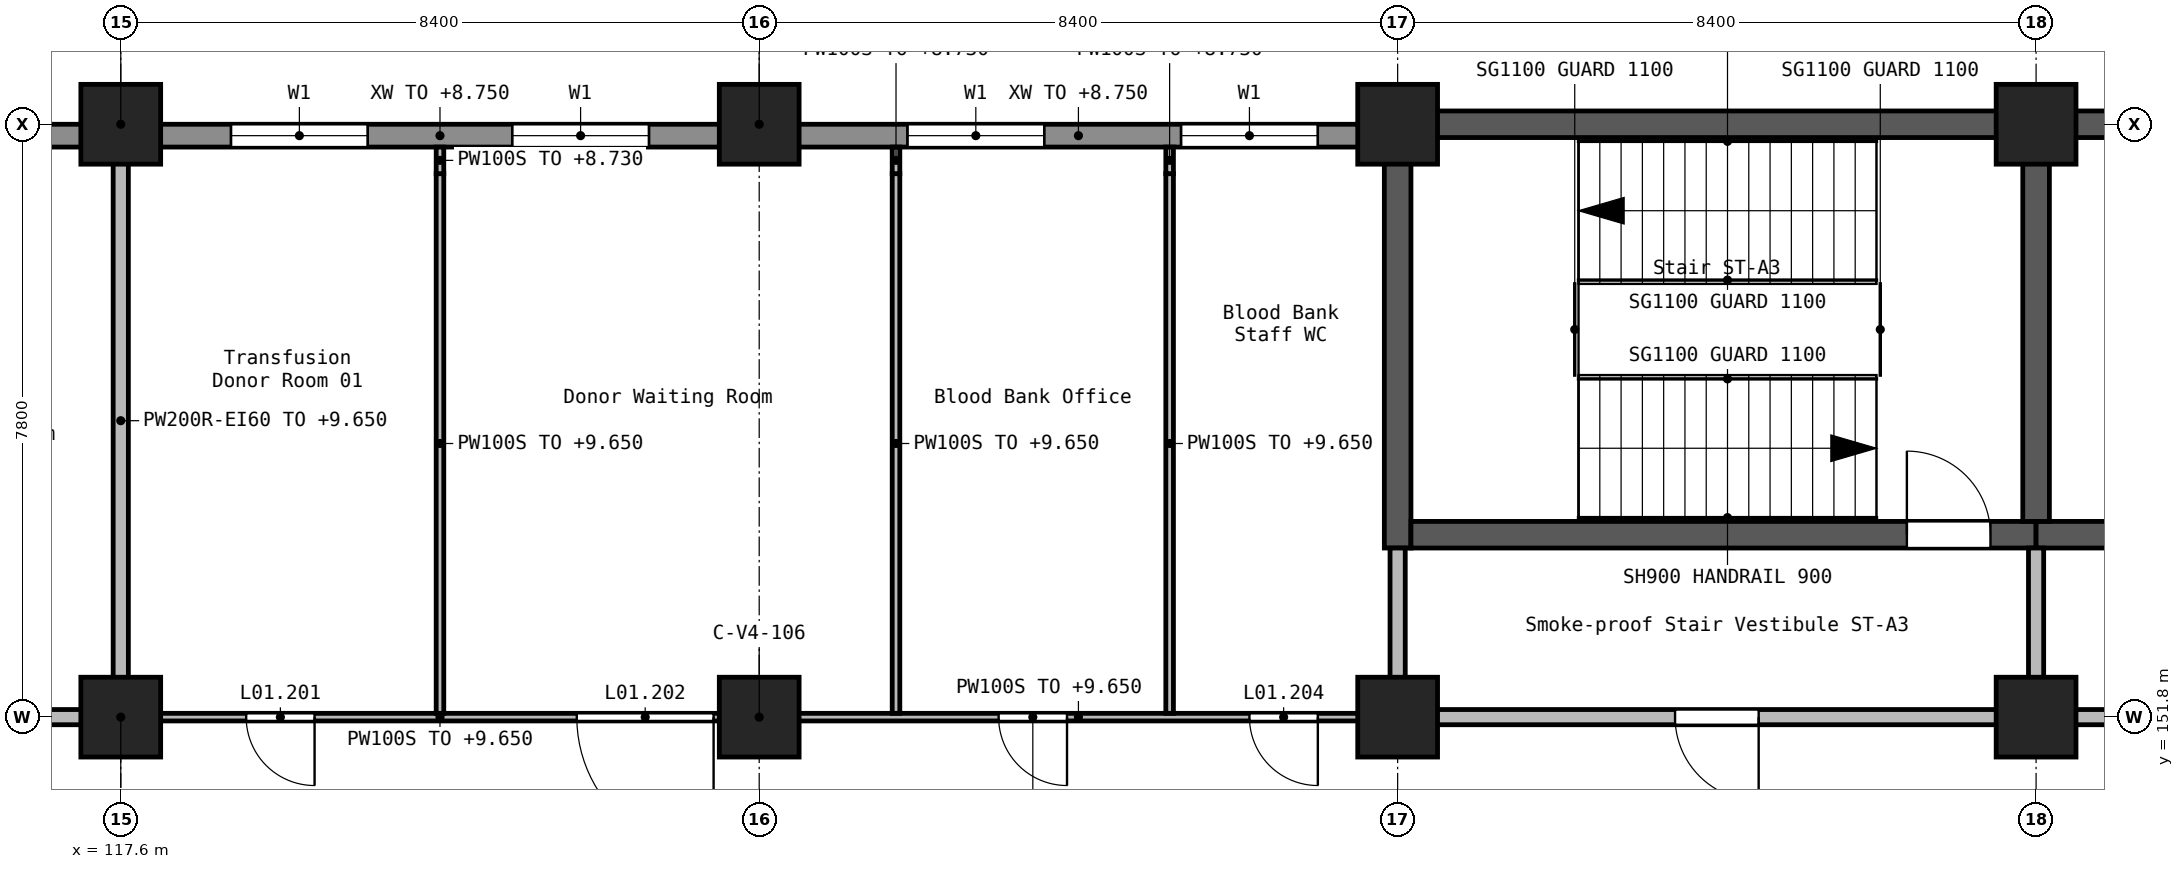
"""IFC4 building model, lengths in metres.
Left out: names, types, materials, properties, quantities, classifications, styles, units other than length and angle.
Written with IfcOpenShell. Run it as: python <this file> out.ifc"""

import sys

from ifc_helpers import new_model, si_unit, direction, frame, frame_2d, origin, origin_2d, place, context, subcontext, project, spatial, rectangle, extrude, element, fill, save


model = new_model("IFC4")
c1 = context("Model", 3, precision=1e-05, world=origin(), true_north=direction((0.0, 1.0)))
c2 = subcontext(c1, "Body", "Model", "MODEL_VIEW")
j1 = project(units=[si_unit("LENGTHUNIT", "METRE"), si_unit("PLANEANGLEUNIT", "RADIAN")], contexts=[c1])
p1 = place(None, origin())
s1 = spatial("IfcSite", under=j1, at=p1, CompositionType="ELEMENT")
p2 = place(p1, origin())
s2 = spatial("IfcBuilding", under=s1, at=p2, CompositionType="ELEMENT")
p3 = place(p2, frame((0.0, 0.0, 5.4)))
s3 = spatial("IfcBuildingStorey", under=s2, at=p3, CompositionType="ELEMENT", Elevation=5.4)
for number, where, z_axis, x_axis in (
    (1, (117.6, 151.8, 0.0), (0.0, 0.0, 1.0), (1.0, 0.0, 0.0)),
    (2, (117.6, 159.6, 0.0), (0.0, 0.0, 1.0), (1.0, 0.0, 0.0)),
    (3, (126.0, 151.8, 0.0), (0.0, 0.0, 1.0), (1.0, 0.0, 0.0)),
    (4, (126.0, 159.6, 0.0), (0.0, 0.0, 1.0), (1.0, 0.0, 0.0)),
    (5, (134.4, 151.8, 0.0), (0.0, 0.0, 1.0), (1.0, 0.0, 0.0)),
    (6, (134.4, 159.6, 0.0), (0.0, 0.0, 1.0), (1.0, 0.0, 0.0)),
    (7, (142.8, 151.8, 0.0), (0.0, 0.0, 1.0), (1.0, 0.0, 0.0)),
    (8, (142.8, 159.6, 0.0), (0.0, 0.0, 1.0), (1.0, 0.0, 0.0)),
):
    element("IfcColumn", number, at=place(p3, frame(where, z_axis=z_axis, x_axis=x_axis)), inside=s3, PredefinedType="COLUMN", context=c2, shape_type="SweptSolid", body=[
        extrude(rectangle(XDim=1.05, YDim=1.05, at=origin_2d()), origin(), (0.0, 0.0, 1.0), 4.5),
    ])
p4 = place(p3, frame((134.225, 159.6, 0.0), z_axis=(0.0, 0.0, 1.0), x_axis=(1.0, 0.0, 0.0)))
e9 = element("IfcWall", 9, at=p4, inside=s3, PredefinedType="SHEAR", context=c2, shape_type="SweptSolid", body=[
    extrude(rectangle(XDim=8.575, YDim=0.35, at=frame_2d((4.288, 0.0))), origin(), (0.0, 0.0, 1.0), 4.5),
])
p5 = place(p3, frame((134.4, 154.025, 0.0), z_axis=(0.0, 0.0, 1.0), x_axis=(0.0, 1.0, 0.0)))
e10 = element("IfcWall", 10, at=p5, inside=s3, PredefinedType="SHEAR", context=c2, shape_type="SweptSolid", body=[
    extrude(rectangle(XDim=5.4, YDim=0.35, at=frame_2d((2.7, 0.0))), origin(), (0.0, 0.0, 1.0), 4.5),
])
p6 = place(p3, frame((134.575, 154.2, 0.0), z_axis=(0.0, 0.0, 1.0), x_axis=(1.0, 0.0, 0.0)))
e11 = element("IfcWall", 11, at=p6, inside=s3, PredefinedType="SHEAR", context=c2, shape_type="SweptSolid", body=[
    extrude(rectangle(XDim=8.225, YDim=0.35, at=frame_2d((4.113, 0.0))), origin(), (0.0, 0.0, 1.0), 4.5),
])
p7 = place(p6, frame((6.525, 0.0, 0.0)))
e12 = element("IfcOpeningElement", 12, at=p7, cuts=e11, PredefinedType="OPENING", context=c2, shape_type="SweptSolid", body=[
    extrude(rectangle(XDim=1.1, YDim=2.1, at=frame_2d((0.55, 1.05))), frame((0.0, 0.185, 0.0), z_axis=(0.0, -1.0, 0.0), x_axis=(1.0, 0.0, 0.0)), (0.0, 0.0, 1.0), 0.37),
])
p8 = place(p3, frame((142.8, 154.2, 0.0), z_axis=(0.0, 0.0, 1.0), x_axis=(1.0, 0.0, 0.0)))
e13 = element("IfcWall", 13, at=p8, inside=s3, PredefinedType="SHEAR", context=c2, shape_type="SweptSolid", body=[
    extrude(rectangle(XDim=8.4, YDim=0.35, at=frame_2d((4.2, 0.0))), origin(), (0.0, 0.0, 1.0), 4.5),
])
p9 = place(p8, frame((6.7, 0.0, 0.0)))
e14 = element("IfcOpeningElement", 14, at=p9, cuts=e13, PredefinedType="OPENING", context=c2, shape_type="SweptSolid", body=[
    extrude(rectangle(XDim=1.1, YDim=2.1, at=frame_2d((0.55, 1.05))), frame((0.0, 0.185, 0.0), z_axis=(0.0, -1.0, 0.0), x_axis=(1.0, 0.0, 0.0)), (0.0, 0.0, 1.0), 0.37),
])
p10 = place(p3, frame((142.8, 154.375, 0.0), z_axis=(0.0, 0.0, 1.0), x_axis=(0.0, 1.0, 0.0)))
e15 = element("IfcWall", 15, at=p10, inside=s3, PredefinedType="SHEAR", context=c2, shape_type="SweptSolid", body=[
    extrude(rectangle(XDim=5.05, YDim=0.35, at=frame_2d((2.525, 0.0))), origin(), (0.0, 0.0, 1.0), 4.5),
])
p11 = place(p3, frame((142.8, 159.6, 0.0), z_axis=(0.0, 0.0, 1.0), x_axis=(1.0, 0.0, 0.0)))
e16 = element("IfcWall", 16, at=p11, inside=s3, PredefinedType="SHEAR", context=c2, shape_type="SweptSolid", body=[
    extrude(rectangle(XDim=8.4, YDim=0.35, at=frame_2d((4.2, 0.0))), origin(), (0.0, 0.0, 1.0), 4.5),
])
p12 = place(p3, frame((133.9, 159.45, 0.0), z_axis=(0.0, 0.0, 1.0), x_axis=(-1.0, 0.0, 0.0)))
e17 = element("IfcWall", 17, at=p12, inside=s3, PredefinedType="STANDARD", context=c2, shape_type="SweptSolid", body=[
    extrude(rectangle(XDim=7.4, YDim=0.3, at=frame_2d((3.7, 0.0))), origin(), (0.0, 0.0, 1.0), 3.35),
])
p13 = place(p12, frame((0.55, 0.0, 0.9)))
e18 = element("IfcOpeningElement", 18, at=p13, cuts=e17, PredefinedType="OPENING", context=c2, shape_type="SweptSolid", body=[
    extrude(rectangle(XDim=1.8, YDim=1.5, at=frame_2d((0.9, 0.75))), frame((0.0, 0.16, 0.0), z_axis=(0.0, -1.0, 0.0), x_axis=(1.0, 0.0, 0.0)), (0.0, 0.0, 1.0), 0.32),
])
p14 = place(p12, frame((4.15, 0.0, 0.9)))
e19 = element("IfcOpeningElement", 19, at=p14, cuts=e17, PredefinedType="OPENING", context=c2, shape_type="SweptSolid", body=[
    extrude(rectangle(XDim=1.8, YDim=1.5, at=frame_2d((0.9, 0.75))), frame((0.0, 0.16, 0.0), z_axis=(0.0, -1.0, 0.0), x_axis=(1.0, 0.0, 0.0)), (0.0, 0.0, 1.0), 0.32),
])
p15 = place(p3, frame((125.5, 159.45, 0.0), z_axis=(0.0, 0.0, 1.0), x_axis=(-1.0, 0.0, 0.0)))
e20 = element("IfcWall", 20, at=p15, inside=s3, PredefinedType="STANDARD", context=c2, shape_type="SweptSolid", body=[
    extrude(rectangle(XDim=7.4, YDim=0.3, at=frame_2d((3.7, 0.0))), origin(), (0.0, 0.0, 1.0), 3.35),
])
p16 = place(p15, frame((0.95, 0.0, 0.9)))
e21 = element("IfcOpeningElement", 21, at=p16, cuts=e20, PredefinedType="OPENING", context=c2, shape_type="SweptSolid", body=[
    extrude(rectangle(XDim=1.8, YDim=1.5, at=frame_2d((0.9, 0.75))), frame((0.0, 0.16, 0.0), z_axis=(0.0, -1.0, 0.0), x_axis=(1.0, 0.0, 0.0)), (0.0, 0.0, 1.0), 0.32),
])
p17 = place(p15, frame((4.65, 0.0, 0.9)))
e22 = element("IfcOpeningElement", 22, at=p17, cuts=e20, PredefinedType="OPENING", context=c2, shape_type="SweptSolid", body=[
    extrude(rectangle(XDim=1.8, YDim=1.5, at=frame_2d((0.9, 0.75))), frame((0.0, 0.16, 0.0), z_axis=(0.0, -1.0, 0.0), x_axis=(1.0, 0.0, 0.0)), (0.0, 0.0, 1.0), 0.32),
])
p18 = place(p3, frame((117.1, 159.45, 0.0), z_axis=(0.0, 0.0, 1.0), x_axis=(-1.0, 0.0, 0.0)))
e23 = element("IfcWall", 23, at=p18, inside=s3, PredefinedType="STANDARD", context=c2, shape_type="SweptSolid", body=[
    extrude(rectangle(XDim=7.4, YDim=0.3, at=frame_2d((3.7, 0.0))), origin(), (0.0, 0.0, 1.0), 3.35),
])
p19 = place(p18, frame((0.95, 0.0, 0.9)))
e24 = element("IfcOpeningElement", 24, at=p19, cuts=e23, PredefinedType="OPENING", context=c2, shape_type="SweptSolid", body=[
    extrude(rectangle(XDim=1.8, YDim=1.5, at=frame_2d((0.9, 0.75))), frame((0.0, 0.16, 0.0), z_axis=(0.0, -1.0, 0.0), x_axis=(1.0, 0.0, 0.0)), (0.0, 0.0, 1.0), 0.32),
])
p20 = place(p18, frame((4.65, 0.0, 0.9)))
e25 = element("IfcOpeningElement", 25, at=p20, cuts=e23, PredefinedType="OPENING", context=c2, shape_type="SweptSolid", body=[
    extrude(rectangle(XDim=1.8, YDim=1.5, at=frame_2d((0.9, 0.75))), frame((0.0, 0.16, 0.0), z_axis=(0.0, -1.0, 0.0), x_axis=(1.0, 0.0, 0.0)), (0.0, 0.0, 1.0), 0.32),
])
p21 = place(p3, frame((150.7, 151.8, 0.0), z_axis=(0.0, 0.0, 1.0), x_axis=(-1.0, 0.0, 0.0)))
e26 = element("IfcWall", 26, at=p21, inside=s3, PredefinedType="SOLIDWALL", context=c2, shape_type="SweptSolid", body=[
    extrude(rectangle(XDim=7.4, YDim=0.2, at=frame_2d((3.7, 0.0))), origin(), (0.0, 0.0, 1.0), 4.25),
])
p22 = place(p21, frame((3.15, 0.0, 0.0)))
e27 = element("IfcOpeningElement", 27, at=p22, cuts=e26, PredefinedType="OPENING", context=c2, shape_type="SweptSolid", body=[
    extrude(rectangle(XDim=1.1, YDim=2.1, at=frame_2d((0.55, 1.05))), frame((0.0, 0.11, 0.0), z_axis=(0.0, -1.0, 0.0), x_axis=(1.0, 0.0, 0.0)), (0.0, 0.0, 1.0), 0.22),
])
p23 = place(p3, frame((142.3, 151.8, 0.0), z_axis=(0.0, 0.0, 1.0), x_axis=(-1.0, 0.0, 0.0)))
e28 = element("IfcWall", 28, at=p23, inside=s3, PredefinedType="SOLIDWALL", context=c2, shape_type="SweptSolid", body=[
    extrude(rectangle(XDim=7.4, YDim=0.2, at=frame_2d((3.7, 0.0))), origin(), (0.0, 0.0, 1.0), 4.25),
])
p24 = place(p23, frame((3.15, 0.0, 0.0)))
e29 = element("IfcOpeningElement", 29, at=p24, cuts=e28, PredefinedType="OPENING", context=c2, shape_type="SweptSolid", body=[
    extrude(rectangle(XDim=1.1, YDim=2.1, at=frame_2d((0.55, 1.05))), frame((0.0, 0.11, 0.0), z_axis=(0.0, -1.0, 0.0), x_axis=(1.0, 0.0, 0.0)), (0.0, 0.0, 1.0), 0.22),
])
p25 = place(p3, frame((109.7, 151.8, 0.0), z_axis=(0.0, 0.0, 1.0), x_axis=(1.0, 0.0, 0.0)))
e30 = element("IfcWall", 30, at=p25, inside=s3, PredefinedType="SOLIDWALL", context=c2, shape_type="SweptSolid", body=[
    extrude(rectangle(XDim=7.4, YDim=0.2, at=frame_2d((3.7, 0.0))), origin(), (0.0, 0.0, 1.0), 4.25),
])
p26 = place(p25, frame((1.4, 0.0, 0.0)))
e31 = element("IfcOpeningElement", 31, at=p26, cuts=e30, PredefinedType="OPENING", context=c2, shape_type="SweptSolid", body=[
    extrude(rectangle(XDim=1.0, YDim=2.1, at=frame_2d((0.5, 1.05))), frame((0.0, 0.11, 0.0), z_axis=(0.0, -1.0, 0.0), x_axis=(1.0, 0.0, 0.0)), (0.0, 0.0, 1.0), 0.22),
])
p27 = place(p25, frame((5.6, 0.0, 0.0)))
e32 = element("IfcOpeningElement", 32, at=p27, cuts=e30, PredefinedType="OPENING", context=c2, shape_type="SweptSolid", body=[
    extrude(rectangle(XDim=1.0, YDim=2.1, at=frame_2d((0.5, 1.05))), frame((0.0, 0.11, 0.0), z_axis=(0.0, -1.0, 0.0), x_axis=(1.0, 0.0, 0.0)), (0.0, 0.0, 1.0), 0.22),
])
p28 = place(p3, frame((117.6, 152.3, 0.0), z_axis=(0.0, 0.0, 1.0), x_axis=(0.0, 1.0, 0.0)))
e33 = element("IfcWall", 33, at=p28, inside=s3, PredefinedType="SOLIDWALL", context=c2, shape_type="SweptSolid", body=[
    extrude(rectangle(XDim=6.8, YDim=0.2, at=frame_2d((3.4, 0.0))), origin(), (0.0, 0.0, 1.0), 4.25),
])
for number, where, z_axis, x_axis in (
    (34, (134.4, 152.3, 0.0), (0.0, 0.0, 1.0), (0.0, 1.0, 0.0)),
    (35, (142.8, 152.3, 0.0), (0.0, 0.0, 1.0), (0.0, 1.0, 0.0)),
):
    element("IfcWall", number, at=place(p3, frame(where, z_axis=z_axis, x_axis=x_axis)), inside=s3, PredefinedType="SOLIDWALL", context=c2, shape_type="SweptSolid", body=[
        extrude(rectangle(XDim=1.725, YDim=0.2, at=frame_2d((0.862, 0.0))), origin(), (0.0, 0.0, 1.0), 4.25),
    ])
p29 = place(p3, frame((133.9, 151.8, 0.0), z_axis=(0.0, 0.0, 1.0), x_axis=(-1.0, 0.0, 0.0)))
e36 = element("IfcWall", 36, at=p29, inside=s3, PredefinedType="PARTITIONING", context=c2, shape_type="SweptSolid", body=[
    extrude(rectangle(XDim=7.4, YDim=0.1, at=frame_2d((3.7, 0.0))), origin(), (0.0, 0.0, 1.0), 4.25),
])
p30 = place(p29, frame((3.85, 0.0, 0.0)))
e37 = element("IfcOpeningElement", 37, at=p30, cuts=e36, PredefinedType="OPENING", context=c2, shape_type="SweptSolid", body=[
    extrude(rectangle(XDim=0.9, YDim=2.1, at=frame_2d((0.45, 1.05))), frame((0.0, 0.06, 0.0), z_axis=(0.0, -1.0, 0.0), x_axis=(1.0, 0.0, 0.0)), (0.0, 0.0, 1.0), 0.12),
])
p31 = place(p29, frame((0.55, 0.0, 0.0)))
e38 = element("IfcOpeningElement", 38, at=p31, cuts=e36, PredefinedType="OPENING", context=c2, shape_type="SweptSolid", body=[
    extrude(rectangle(XDim=0.9, YDim=2.1, at=frame_2d((0.45, 1.05))), frame((0.0, 0.06, 0.0), z_axis=(0.0, -1.0, 0.0), x_axis=(1.0, 0.0, 0.0)), (0.0, 0.0, 1.0), 0.12),
])
p32 = place(p3, frame((125.5, 151.8, 0.0), z_axis=(0.0, 0.0, 1.0), x_axis=(-1.0, 0.0, 0.0)))
e39 = element("IfcWall", 39, at=p32, inside=s3, PredefinedType="PARTITIONING", context=c2, shape_type="SweptSolid", body=[
    extrude(rectangle(XDim=7.4, YDim=0.1, at=frame_2d((3.7, 0.0))), origin(), (0.0, 0.0, 1.0), 4.25),
])
p33 = place(p32, frame((5.35, 0.0, 0.0)))
e40 = element("IfcOpeningElement", 40, at=p33, cuts=e39, PredefinedType="OPENING", context=c2, shape_type="SweptSolid", body=[
    extrude(rectangle(XDim=0.9, YDim=2.1, at=frame_2d((0.45, 1.05))), frame((0.0, 0.06, 0.0), z_axis=(0.0, -1.0, 0.0), x_axis=(1.0, 0.0, 0.0)), (0.0, 0.0, 1.0), 0.12),
])
p34 = place(p32, frame((0.1, 0.0, 0.0)))
e41 = element("IfcOpeningElement", 41, at=p34, cuts=e39, PredefinedType="OPENING", context=c2, shape_type="SweptSolid", body=[
    extrude(rectangle(XDim=1.8, YDim=2.1, at=frame_2d((0.9, 1.05))), frame((0.0, 0.06, 0.0), z_axis=(0.0, -1.0, 0.0), x_axis=(1.0, 0.0, 0.0)), (0.0, 0.0, 1.0), 0.12),
])
p35 = place(p3, frame((121.8, 151.85, 0.0), z_axis=(0.0, 0.0, 1.0), x_axis=(0.0, 1.0, 0.0)))
e42 = element("IfcWall", 42, at=p35, inside=s3, PredefinedType="PARTITIONING", context=c2, shape_type="SweptSolid", body=[
    extrude(rectangle(XDim=7.1, YDim=0.1, at=frame_2d((3.55, 0.0))), origin(), (0.0, 0.0, 1.0), 4.25),
])
p36 = place(p3, frame((121.8, 158.95, 0.0), z_axis=(0.0, 0.0, 1.0), x_axis=(0.0, 1.0, 0.0)))
e43 = element("IfcWall", 43, at=p36, inside=s3, PredefinedType="PARTITIONING", context=c2, shape_type="SweptSolid", body=[
    extrude(rectangle(XDim=0.35, YDim=0.1, at=frame_2d((0.175, 0.0))), origin(), (0.0, 0.0, 1.0), 3.33),
])
p37 = place(p3, frame((127.8, 151.85, 0.0), z_axis=(0.0, 0.0, 1.0), x_axis=(0.0, 1.0, 0.0)))
e44 = element("IfcWall", 44, at=p37, inside=s3, PredefinedType="PARTITIONING", context=c2, shape_type="SweptSolid", body=[
    extrude(rectangle(XDim=7.1, YDim=0.1, at=frame_2d((3.55, 0.0))), origin(), (0.0, 0.0, 1.0), 4.25),
])
p38 = place(p3, frame((127.8, 158.95, 0.0), z_axis=(0.0, 0.0, 1.0), x_axis=(0.0, 1.0, 0.0)))
e45 = element("IfcWall", 45, at=p38, inside=s3, PredefinedType="PARTITIONING", context=c2, shape_type="SweptSolid", body=[
    extrude(rectangle(XDim=0.35, YDim=0.1, at=frame_2d((0.175, 0.0))), origin(), (0.0, 0.0, 1.0), 3.33),
])
p39 = place(p3, frame((131.4, 151.85, 0.0), z_axis=(0.0, 0.0, 1.0), x_axis=(0.0, 1.0, 0.0)))
e46 = element("IfcWall", 46, at=p39, inside=s3, PredefinedType="PARTITIONING", context=c2, shape_type="SweptSolid", body=[
    extrude(rectangle(XDim=7.1, YDim=0.1, at=frame_2d((3.55, 0.0))), origin(), (0.0, 0.0, 1.0), 4.25),
])
p40 = place(p3, frame((131.4, 158.95, 0.0), z_axis=(0.0, 0.0, 1.0), x_axis=(0.0, 1.0, 0.0)))
e47 = element("IfcWall", 47, at=p40, inside=s3, PredefinedType="PARTITIONING", context=c2, shape_type="SweptSolid", body=[
    extrude(rectangle(XDim=0.35, YDim=0.1, at=frame_2d((0.175, 0.0))), origin(), (0.0, 0.0, 1.0), 3.33),
])
p41 = place(p13, origin())
e48 = element("IfcWindow", 48, at=p41, inside=s3, PartitioningType="SINGLE_PANEL", PredefinedType="WINDOW", context=c2, shape_type="SweptSolid", body=[
    extrude(rectangle(XDim=1.8, YDim=1.5, at=frame_2d((0.9, 0.75))), frame((0.0, 0.03, 0.0), z_axis=(0.0, -1.0, 0.0), x_axis=(1.0, 0.0, 0.0)), (0.0, 0.0, 1.0), 0.06),
])
fill(e18, e48)
p42 = place(p14, origin())
e49 = element("IfcWindow", 49, at=p42, inside=s3, PartitioningType="SINGLE_PANEL", PredefinedType="WINDOW", context=c2, shape_type="SweptSolid", body=[
    extrude(rectangle(XDim=1.8, YDim=1.5, at=frame_2d((0.9, 0.75))), frame((0.0, 0.03, 0.0), z_axis=(0.0, -1.0, 0.0), x_axis=(1.0, 0.0, 0.0)), (0.0, 0.0, 1.0), 0.06),
])
fill(e19, e49)
p43 = place(p16, origin())
e50 = element("IfcWindow", 50, at=p43, inside=s3, PartitioningType="SINGLE_PANEL", PredefinedType="WINDOW", context=c2, shape_type="SweptSolid", body=[
    extrude(rectangle(XDim=1.8, YDim=1.5, at=frame_2d((0.9, 0.75))), frame((0.0, 0.03, 0.0), z_axis=(0.0, -1.0, 0.0), x_axis=(1.0, 0.0, 0.0)), (0.0, 0.0, 1.0), 0.06),
])
fill(e21, e50)
p44 = place(p17, origin())
e51 = element("IfcWindow", 51, at=p44, inside=s3, PartitioningType="SINGLE_PANEL", PredefinedType="WINDOW", context=c2, shape_type="SweptSolid", body=[
    extrude(rectangle(XDim=1.8, YDim=1.5, at=frame_2d((0.9, 0.75))), frame((0.0, 0.03, 0.0), z_axis=(0.0, -1.0, 0.0), x_axis=(1.0, 0.0, 0.0)), (0.0, 0.0, 1.0), 0.06),
])
fill(e22, e51)
p45 = place(p7, origin())
e52 = element("IfcDoor", 52, at=p45, inside=s3, OperationType="SINGLE_SWING_RIGHT", PredefinedType="DOOR", context=c2, shape_type="SweptSolid", body=[
    extrude(rectangle(XDim=1.1, YDim=2.1, at=frame_2d((0.55, 1.05))), frame((0.0, 0.025, 0.0), z_axis=(0.0, -1.0, 0.0), x_axis=(1.0, 0.0, 0.0)), (0.0, 0.0, 1.0), 0.05),
])
fill(e12, e52)
p46 = place(p24, frame((1.1, 0.0, 0.0), z_axis=(0.0, 0.0, 1.0), x_axis=(-1.0, 0.0, 0.0)))
e53 = element("IfcDoor", 53, at=p46, inside=s3, OperationType="SINGLE_SWING_RIGHT", PredefinedType="DOOR", context=c2, shape_type="SweptSolid", body=[
    extrude(rectangle(XDim=1.1, YDim=2.1, at=frame_2d((0.55, 1.05))), frame((0.0, 0.025, 0.0), z_axis=(0.0, -1.0, 0.0), x_axis=(1.0, 0.0, 0.0)), (0.0, 0.0, 1.0), 0.05),
])
fill(e29, e53)
p47 = place(p33, frame((0.9, 0.0, 0.0), z_axis=(0.0, 0.0, 1.0), x_axis=(-1.0, 0.0, 0.0)))
e54 = element("IfcDoor", 54, at=p47, inside=s3, OperationType="SINGLE_SWING_LEFT", PredefinedType="DOOR", context=c2, shape_type="SweptSolid", body=[
    extrude(rectangle(XDim=0.9, YDim=2.1, at=frame_2d((0.45, 1.05))), frame((0.0, 0.025, 0.0), z_axis=(0.0, -1.0, 0.0), x_axis=(1.0, 0.0, 0.0)), (0.0, 0.0, 1.0), 0.05),
])
fill(e40, e54)
p48 = place(p34, frame((1.8, 0.0, 0.0), z_axis=(0.0, 0.0, 1.0), x_axis=(-1.0, 0.0, 0.0)))
e55 = element("IfcDoor", 55, at=p48, inside=s3, OperationType="DOUBLE_DOOR_SINGLE_SWING", PredefinedType="DOOR", context=c2, shape_type="SweptSolid", body=[
    extrude(rectangle(XDim=1.8, YDim=2.1, at=frame_2d((0.9, 1.05))), frame((0.0, 0.025, 0.0), z_axis=(0.0, -1.0, 0.0), x_axis=(1.0, 0.0, 0.0)), (0.0, 0.0, 1.0), 0.05),
])
fill(e41, e55)
p49 = place(p30, frame((0.9, 0.0, 0.0), z_axis=(0.0, 0.0, 1.0), x_axis=(-1.0, 0.0, 0.0)))
e56 = element("IfcDoor", 56, at=p49, inside=s3, OperationType="SINGLE_SWING_LEFT", PredefinedType="DOOR", context=c2, shape_type="SweptSolid", body=[
    extrude(rectangle(XDim=0.9, YDim=2.1, at=frame_2d((0.45, 1.05))), frame((0.0, 0.025, 0.0), z_axis=(0.0, -1.0, 0.0), x_axis=(1.0, 0.0, 0.0)), (0.0, 0.0, 1.0), 0.05),
])
fill(e37, e56)
p50 = place(p31, frame((0.9, 0.0, 0.0), z_axis=(0.0, 0.0, 1.0), x_axis=(-1.0, 0.0, 0.0)))
e57 = element("IfcDoor", 57, at=p50, inside=s3, OperationType="SINGLE_SWING_RIGHT", PredefinedType="DOOR", context=c2, shape_type="SweptSolid", body=[
    extrude(rectangle(XDim=0.9, YDim=2.1, at=frame_2d((0.45, 1.05))), frame((0.0, 0.025, 0.0), z_axis=(0.0, -1.0, 0.0), x_axis=(1.0, 0.0, 0.0)), (0.0, 0.0, 1.0), 0.05),
])
fill(e38, e57)
save(model, sys.argv[1])
